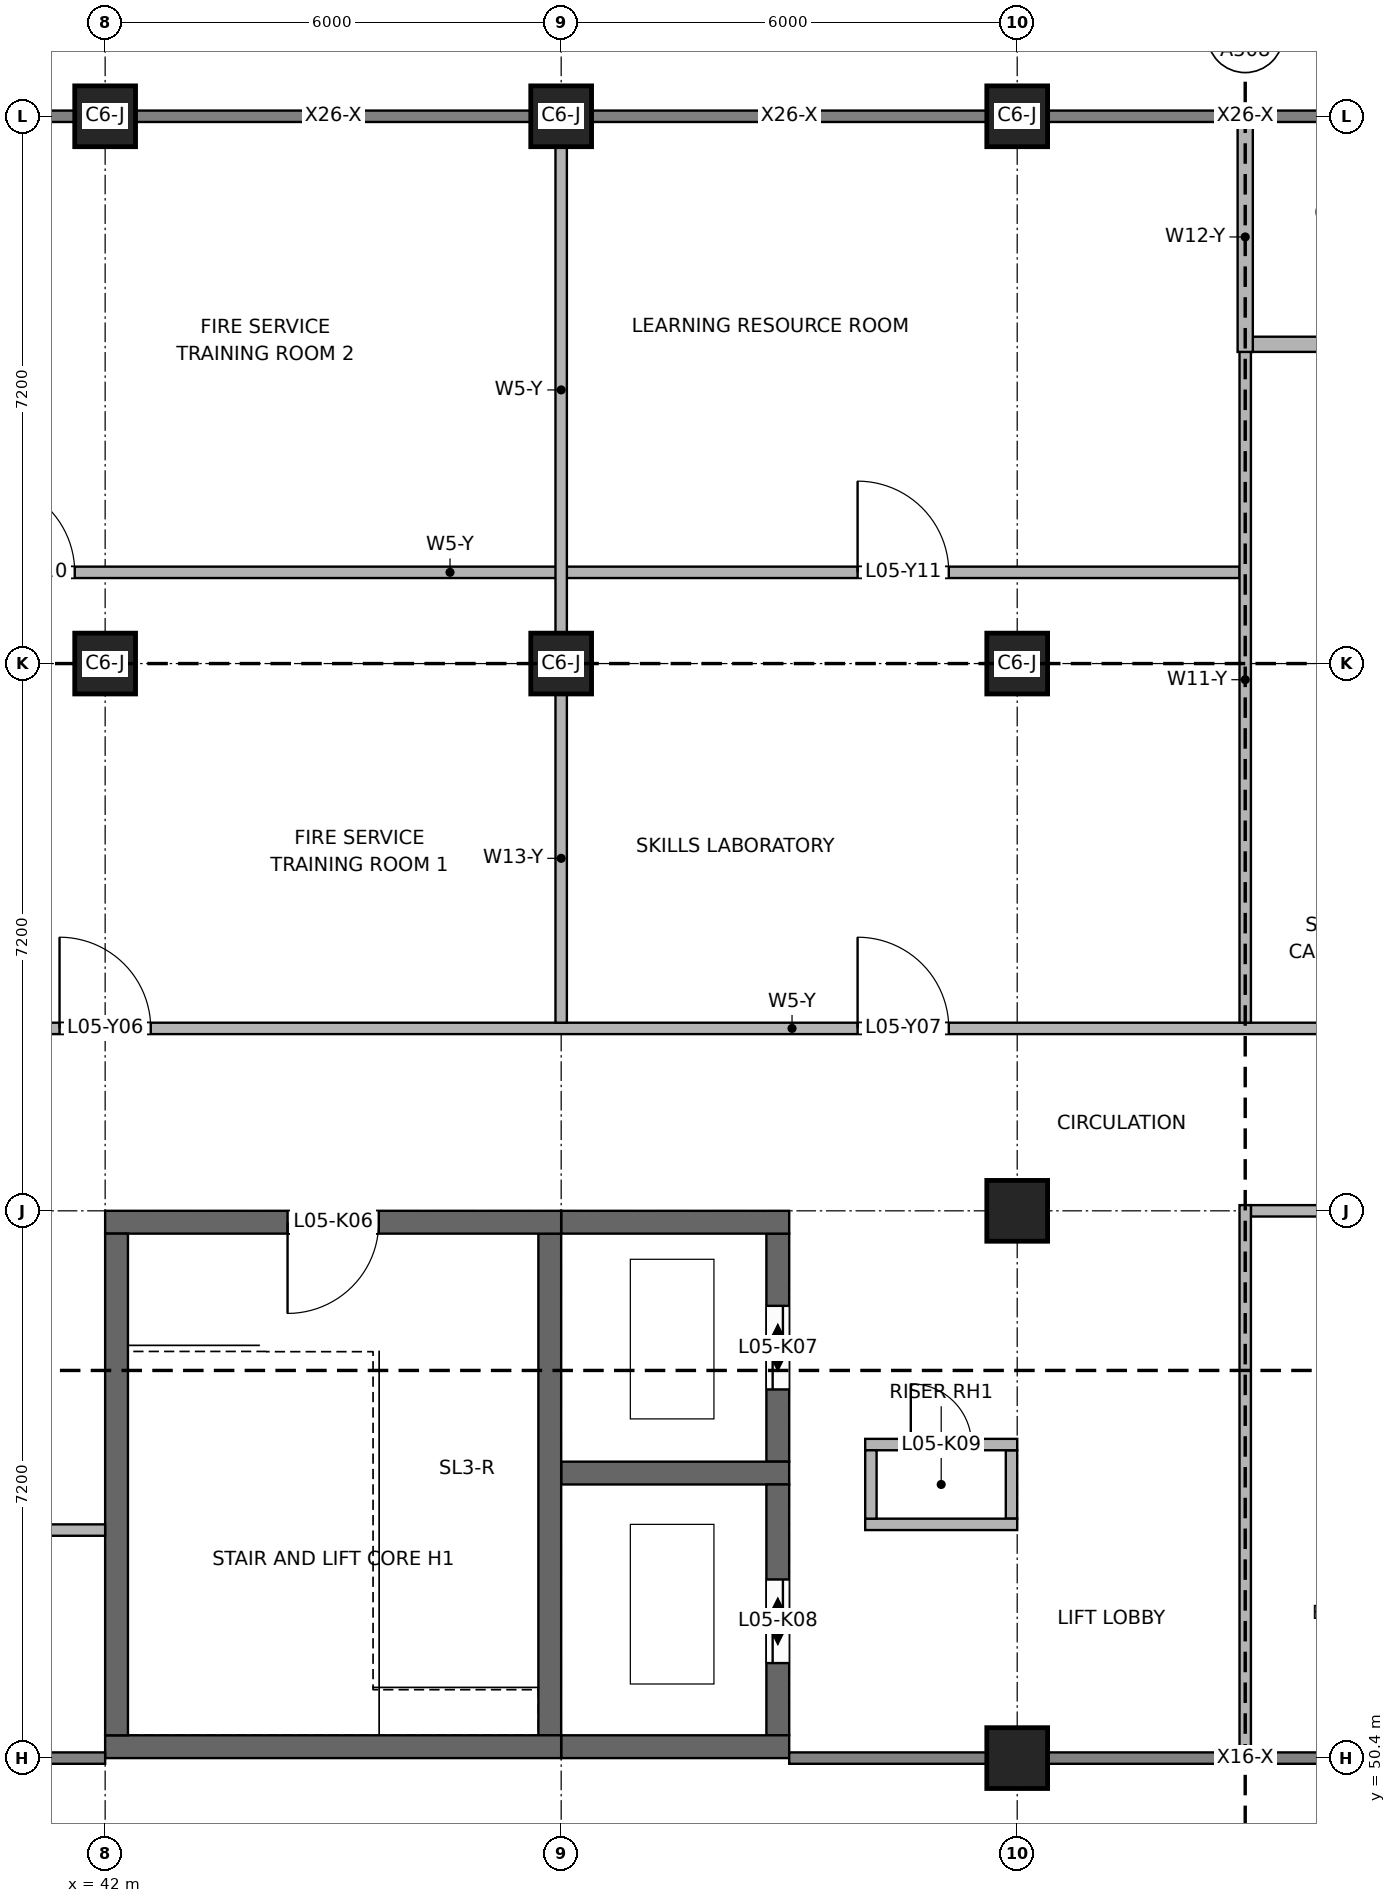
"""IFC4 building model, lengths in metres.
Left out: names, types, materials, properties, quantities, classifications, styles, units other than length and angle.
Written with IfcOpenShell. Run it as: python <this file> out.ifc"""

import sys

from ifc_helpers import new_model, si_unit, direction, frame, frame_2d, origin, origin_2d, place, context, subcontext, project, spatial, rectangle, extrude, element, fill, save


model = new_model("IFC4")
c1 = context("Model", 3, precision=1e-05, world=origin(), true_north=direction((0.0, 1.0)))
c2 = subcontext(c1, "Body", "Model", "MODEL_VIEW")
j1 = project(units=[si_unit("LENGTHUNIT", "METRE"), si_unit("PLANEANGLEUNIT", "RADIAN")], contexts=[c1])
p1 = place(None, origin())
s1 = spatial("IfcSite", under=j1, at=p1, CompositionType="ELEMENT")
p2 = place(p1, origin())
s2 = spatial("IfcBuilding", under=s1, at=p2, CompositionType="ELEMENT")
p3 = place(p2, frame((0.0, 0.0, 21.0)))
s3 = spatial("IfcBuildingStorey", under=s2, at=p3, CompositionType="ELEMENT", Elevation=21.0)
p4 = place(p3, frame((42.0, 50.55, 0.0), z_axis=(0.0, 0.0, 1.0), x_axis=(1.0, 0.0, 0.0)))
e1 = element("IfcWall", 1, at=p4, inside=s3, PredefinedType="SHEAR", context=c2, shape_type="SweptSolid", body=[
    extrude(rectangle(XDim=6.0, YDim=0.3, at=frame_2d((3.0, 0.0))), origin(), (0.0, 0.0, 1.0), 3.95),
])
p5 = place(p3, frame((42.0, 57.45, 0.0), z_axis=(0.0, 0.0, 1.0), x_axis=(1.0, 0.0, 0.0)))
e2 = element("IfcWall", 2, at=p5, inside=s3, PredefinedType="SHEAR", context=c2, shape_type="SweptSolid", body=[
    extrude(rectangle(XDim=6.0, YDim=0.3, at=frame_2d((3.0, 0.0))), origin(), (0.0, 0.0, 1.0), 3.95),
])
p6 = place(p5, frame((2.4, 0.0, 0.0)))
e3 = element("IfcOpeningElement", 3, at=p6, cuts=e2, PredefinedType="OPENING", context=c2, shape_type="SweptSolid", body=[
    extrude(rectangle(XDim=1.2, YDim=2.1, at=frame_2d((0.6, 1.05))), frame((0.0, 0.16, 0.0), z_axis=(0.0, -1.0, 0.0), x_axis=(1.0, 0.0, 0.0)), (0.0, 0.0, 1.0), 0.32),
])
for number, where, z_axis, x_axis in (
    (4, (42.15, 50.7, 0.0), (0.0, 0.0, 1.0), (0.0, 1.0, 0.0)),
    (5, (47.85, 50.7, 0.0), (0.0, 0.0, 1.0), (0.0, 1.0, 0.0)),
):
    element("IfcWall", number, at=place(p3, frame(where, z_axis=z_axis, x_axis=x_axis)), inside=s3, PredefinedType="SHEAR", context=c2, shape_type="SweptSolid", body=[
        extrude(rectangle(XDim=6.6, YDim=0.3, at=frame_2d((3.3, 0.0))), origin(), (0.0, 0.0, 1.0), 3.95),
    ])
for number, where, z_axis, x_axis in (
    (6, (48.0, 54.15, 0.0), (0.0, 0.0, 1.0), (1.0, 0.0, 0.0)),
    (7, (48.0, 57.45, 0.0), (0.0, 0.0, 1.0), (1.0, 0.0, 0.0)),
):
    element("IfcWall", number, at=place(p3, frame(where, z_axis=z_axis, x_axis=x_axis)), inside=s3, PredefinedType="SHEAR", context=c2, shape_type="SweptSolid", body=[
        extrude(rectangle(XDim=3.0, YDim=0.3, at=frame_2d((1.5, 0.0))), origin(), (0.0, 0.0, 1.0), 5.75),
    ])
p7 = place(p3, frame((50.85, 54.3, 0.0), z_axis=(0.0, 0.0, 1.0), x_axis=(0.0, 1.0, 0.0)))
e8 = element("IfcWall", 8, at=p7, inside=s3, PredefinedType="SHEAR", context=c2, shape_type="SweptSolid", body=[
    extrude(rectangle(XDim=3.0, YDim=0.3, at=frame_2d((1.5, 0.0))), origin(), (0.0, 0.0, 1.0), 5.75),
])
p8 = place(p7, frame((0.95, 0.0, 0.0)))
e9 = element("IfcOpeningElement", 9, at=p8, cuts=e8, PredefinedType="OPENING", context=c2, shape_type="SweptSolid", body=[
    extrude(rectangle(XDim=1.1, YDim=2.1, at=frame_2d((0.55, 1.05))), frame((0.0, 0.16, 0.0), z_axis=(0.0, -1.0, 0.0), x_axis=(1.0, 0.0, 0.0)), (0.0, 0.0, 1.0), 0.32),
])
p9 = place(p3, frame((48.0, 50.55, 0.0), z_axis=(0.0, 0.0, 1.0), x_axis=(1.0, 0.0, 0.0)))
e10 = element("IfcWall", 10, at=p9, inside=s3, PredefinedType="SHEAR", context=c2, shape_type="SweptSolid", body=[
    extrude(rectangle(XDim=3.0, YDim=0.3, at=frame_2d((1.5, 0.0))), origin(), (0.0, 0.0, 1.0), 5.75),
])
p10 = place(p3, frame((50.85, 50.7, 0.0), z_axis=(0.0, 0.0, 1.0), x_axis=(0.0, 1.0, 0.0)))
e11 = element("IfcWall", 11, at=p10, inside=s3, PredefinedType="SHEAR", context=c2, shape_type="SweptSolid", body=[
    extrude(rectangle(XDim=3.3, YDim=0.3, at=frame_2d((1.65, 0.0))), origin(), (0.0, 0.0, 1.0), 5.75),
])
p11 = place(p10, frame((0.95, 0.0, 0.0)))
e12 = element("IfcOpeningElement", 12, at=p11, cuts=e11, PredefinedType="OPENING", context=c2, shape_type="SweptSolid", body=[
    extrude(rectangle(XDim=1.1, YDim=2.1, at=frame_2d((0.55, 1.05))), frame((0.0, 0.16, 0.0), z_axis=(0.0, -1.0, 0.0), x_axis=(1.0, 0.0, 0.0)), (0.0, 0.0, 1.0), 0.32),
])
p12 = place(p3, frame((52.0, 53.475, 0.0), z_axis=(0.0, 0.0, 1.0), x_axis=(1.0, 0.0, 0.0)))
e13 = element("IfcWall", 13, at=p12, inside=s3, PredefinedType="SOLIDWALL", context=c2, shape_type="SweptSolid", body=[
    extrude(rectangle(XDim=2.0, YDim=0.15, at=frame_2d((1.0, 0.0))), origin(), (0.0, 0.0, 1.0), 3.95),
])
p13 = place(p3, frame((52.0, 54.525, 0.0), z_axis=(0.0, 0.0, 1.0), x_axis=(1.0, 0.0, 0.0)))
e14 = element("IfcWall", 14, at=p13, inside=s3, PredefinedType="SOLIDWALL", context=c2, shape_type="SweptSolid", body=[
    extrude(rectangle(XDim=2.0, YDim=0.15, at=frame_2d((1.0, 0.0))), origin(), (0.0, 0.0, 1.0), 3.95),
])
p14 = place(p13, frame((0.6, 0.0, 0.0)))
e15 = element("IfcOpeningElement", 15, at=p14, cuts=e14, PredefinedType="OPENING", context=c2, shape_type="SweptSolid", body=[
    extrude(rectangle(XDim=0.8, YDim=2.1, at=frame_2d((0.4, 1.05))), frame((0.0, 0.085, 0.0), z_axis=(0.0, -1.0, 0.0), x_axis=(1.0, 0.0, 0.0)), (0.0, 0.0, 1.0), 0.17),
])
p15 = place(p3, frame((52.075, 53.55, 0.0), z_axis=(0.0, 0.0, 1.0), x_axis=(0.0, 1.0, 0.0)))
e16 = element("IfcWall", 16, at=p15, inside=s3, PredefinedType="SOLIDWALL", context=c2, shape_type="SweptSolid", body=[
    extrude(rectangle(XDim=0.9, YDim=0.15, at=frame_2d((0.45, 0.0))), origin(), (0.0, 0.0, 1.0), 3.95),
])
p16 = place(p3, frame((53.925, 53.55, 0.0), z_axis=(0.0, 0.0, 1.0), x_axis=(0.0, 1.0, 0.0)))
e17 = element("IfcWall", 17, at=p16, inside=s3, PredefinedType="SOLIDWALL", context=c2, shape_type="SweptSolid", body=[
    extrude(rectangle(XDim=0.9, YDim=0.15, at=frame_2d((0.45, 0.0))), origin(), (0.0, 0.0, 1.0), 3.15),
])
for number, where, z_axis, x_axis in (
    (18, (54.0, 50.4, 0.0), (0.0, 0.0, 1.0), (1.0, 0.0, 0.0)),
    (19, (54.0, 57.6, 0.0), (0.0, 0.0, 1.0), (1.0, 0.0, 0.0)),
    (20, (42.0, 64.8, 0.0), (0.0, 0.0, 1.0), (1.0, 0.0, 0.0)),
    (21, (48.0, 64.8, 0.0), (0.0, 0.0, 1.0), (1.0, 0.0, 0.0)),
    (22, (54.0, 64.8, 0.0), (0.0, 0.0, 1.0), (1.0, 0.0, 0.0)),
    (23, (42.0, 72.0, 0.0), (0.0, 0.0, 1.0), (1.0, 0.0, 0.0)),
    (24, (48.0, 72.0, 0.0), (0.0, 0.0, 1.0), (1.0, 0.0, 0.0)),
    (25, (54.0, 72.0, 0.0), (0.0, 0.0, 1.0), (1.0, 0.0, 0.0)),
):
    element("IfcColumn", number, at=place(p3, frame(where, z_axis=z_axis, x_axis=x_axis)), inside=s3, PredefinedType="COLUMN", context=c2, shape_type="SweptSolid", body=[
        extrude(rectangle(XDim=0.8, YDim=0.8, at=origin_2d()), origin(), (0.0, 0.0, 1.0), 3.95),
    ])
p17 = place(p3, frame((48.0, 60.075, 0.0), z_axis=(0.0, 0.0, 1.0), x_axis=(0.0, 1.0, 0.0)))
e26 = element("IfcWall", 26, at=p17, inside=s3, PredefinedType="PARTITIONING", context=c2, shape_type="SweptSolid", body=[
    extrude(rectangle(XDim=4.325, YDim=0.15, at=frame_2d((2.163, 0.0))), origin(), (0.0, 0.0, 1.0), 3.95),
])
p18 = place(p3, frame((48.0, 65.2, 0.0), z_axis=(0.0, 0.0, 1.0), x_axis=(0.0, 1.0, 0.0)))
e27 = element("IfcWall", 27, at=p18, inside=s3, PredefinedType="PARTITIONING", context=c2, shape_type="SweptSolid", body=[
    extrude(rectangle(XDim=6.4, YDim=0.15, at=frame_2d((3.2, 0.0))), origin(), (0.0, 0.0, 1.0), 3.15),
])
p19 = place(p3, frame((57.0, 50.475, 0.0), z_axis=(0.0, 0.0, 1.0), x_axis=(0.0, 1.0, 0.0)))
e28 = element("IfcWall", 28, at=p19, inside=s3, PredefinedType="PARTITIONING", context=c2, shape_type="SweptSolid", body=[
    extrude(rectangle(XDim=7.2, YDim=0.15, at=frame_2d((3.6, 0.0))), origin(), (0.0, 0.0, 1.0), 3.25),
])
p20 = place(p3, frame((57.0, 60.075, 0.0), z_axis=(0.0, 0.0, 1.0), x_axis=(0.0, 1.0, 0.0)))
e29 = element("IfcWall", 29, at=p20, inside=s3, PredefinedType="PARTITIONING", context=c2, shape_type="SweptSolid", body=[
    extrude(rectangle(XDim=9.025, YDim=0.15, at=frame_2d((4.513, 0.0))), origin(), (0.0, 0.0, 1.0), 3.25),
])
p21 = place(p3, frame((57.0, 68.9, 0.0), z_axis=(0.0, 0.0, 1.0), x_axis=(0.0, 1.0, 0.0)))
e30 = element("IfcWall", 30, at=p21, inside=s3, PredefinedType="PARTITIONING", context=c2, shape_type="SweptSolid", body=[
    extrude(rectangle(XDim=3.025, YDim=0.2, at=frame_2d((1.513, 0.0))), origin(), (0.0, 0.0, 1.0), 3.25),
])
p22 = place(p3, frame((39.675, 53.4, 0.0), z_axis=(0.0, 0.0, 1.0), x_axis=(1.0, 0.0, 0.0)))
e31 = element("IfcWall", 31, at=p22, inside=s3, PredefinedType="PARTITIONING", context=c2, shape_type="SweptSolid", body=[
    extrude(rectangle(XDim=2.325, YDim=0.15, at=frame_2d((1.163, 0.0))), origin(), (0.0, 0.0, 1.0), 3.95),
])
p23 = place(p3, frame((57.075, 57.6, 0.0), z_axis=(0.0, 0.0, 1.0), x_axis=(1.0, 0.0, 0.0)))
e32 = element("IfcWall", 32, at=p23, inside=s3, PredefinedType="PARTITIONING", context=c2, shape_type="SweptSolid", body=[
    extrude(rectangle(XDim=26.525, YDim=0.15, at=frame_2d((13.263, 0.0))), origin(), (0.0, 0.0, 1.0), 3.25),
])
p24 = place(p23, frame((3.825, 0.0, 0.0)))
e33 = element("IfcOpeningElement", 33, at=p24, cuts=e32, PredefinedType="OPENING", context=c2, shape_type="SweptSolid", body=[
    extrude(rectangle(XDim=1.2, YDim=2.1, at=frame_2d((0.6, 1.05))), frame((0.0, 0.085, 0.0), z_axis=(0.0, -1.0, 0.0), x_axis=(1.0, 0.0, 0.0)), (0.0, 0.0, 1.0), 0.17),
])
p25 = place(p23, frame((11.175, 0.0, 0.0)))
e34 = element("IfcOpeningElement", 34, at=p25, cuts=e32, PredefinedType="OPENING", context=c2, shape_type="SweptSolid", body=[
    extrude(rectangle(XDim=0.9, YDim=2.1, at=frame_2d((0.45, 1.05))), frame((0.0, 0.085, 0.0), z_axis=(0.0, -1.0, 0.0), x_axis=(1.0, 0.0, 0.0)), (0.0, 0.0, 1.0), 0.17),
])
p26 = place(p23, frame((15.975, 0.0, 0.0)))
e35 = element("IfcOpeningElement", 35, at=p26, cuts=e32, PredefinedType="OPENING", context=c2, shape_type="SweptSolid", body=[
    extrude(rectangle(XDim=0.9, YDim=2.1, at=frame_2d((0.45, 1.05))), frame((0.0, 0.085, 0.0), z_axis=(0.0, -1.0, 0.0), x_axis=(1.0, 0.0, 0.0)), (0.0, 0.0, 1.0), 0.17),
])
p27 = place(p23, frame((21.975, 0.0, 0.0)))
e36 = element("IfcOpeningElement", 36, at=p27, cuts=e32, PredefinedType="OPENING", context=c2, shape_type="SweptSolid", body=[
    extrude(rectangle(XDim=0.9, YDim=2.1, at=frame_2d((0.45, 1.05))), frame((0.0, 0.085, 0.0), z_axis=(0.0, -1.0, 0.0), x_axis=(1.0, 0.0, 0.0)), (0.0, 0.0, 1.0), 0.17),
])
p28 = place(p3, frame((36.15, 60.0, 0.0), z_axis=(0.0, 0.0, 1.0), x_axis=(1.0, 0.0, 0.0)))
e37 = element("IfcWall", 37, at=p28, inside=s3, PredefinedType="PARTITIONING", context=c2, shape_type="SweptSolid", body=[
    extrude(rectangle(XDim=29.775, YDim=0.15, at=frame_2d((14.888, 0.0))), origin(), (0.0, 0.0, 1.0), 3.15),
])
p29 = place(p28, frame((5.25, 0.0, 0.0)))
e38 = element("IfcOpeningElement", 38, at=p29, cuts=e37, PredefinedType="OPENING", context=c2, shape_type="SweptSolid", body=[
    extrude(rectangle(XDim=1.2, YDim=2.1, at=frame_2d((0.6, 1.05))), frame((0.0, 0.085, 0.0), z_axis=(0.0, -1.0, 0.0), x_axis=(1.0, 0.0, 0.0)), (0.0, 0.0, 1.0), 0.17),
])
p30 = place(p28, frame((15.75, 0.0, 0.0)))
e39 = element("IfcOpeningElement", 39, at=p30, cuts=e37, PredefinedType="OPENING", context=c2, shape_type="SweptSolid", body=[
    extrude(rectangle(XDim=1.2, YDim=2.1, at=frame_2d((0.6, 1.05))), frame((0.0, 0.085, 0.0), z_axis=(0.0, -1.0, 0.0), x_axis=(1.0, 0.0, 0.0)), (0.0, 0.0, 1.0), 0.17),
])
p31 = place(p28, frame((24.75, 0.0, 0.0)))
e40 = element("IfcOpeningElement", 40, at=p31, cuts=e37, PredefinedType="OPENING", context=c2, shape_type="SweptSolid", body=[
    extrude(rectangle(XDim=1.2, YDim=2.1, at=frame_2d((0.6, 1.05))), frame((0.0, 0.085, 0.0), z_axis=(0.0, -1.0, 0.0), x_axis=(1.0, 0.0, 0.0)), (0.0, 0.0, 1.0), 0.17),
])
p32 = place(p3, frame((36.15, 66.0, 0.0), z_axis=(0.0, 0.0, 1.0), x_axis=(1.0, 0.0, 0.0)))
e41 = element("IfcWall", 41, at=p32, inside=s3, PredefinedType="PARTITIONING", context=c2, shape_type="SweptSolid", body=[
    extrude(rectangle(XDim=20.775, YDim=0.15, at=frame_2d((10.388, 0.0))), origin(), (0.0, 0.0, 1.0), 3.15),
])
p33 = place(p32, frame((4.25, 0.0, 0.0)))
e42 = element("IfcOpeningElement", 42, at=p33, cuts=e41, PredefinedType="OPENING", context=c2, shape_type="SweptSolid", body=[
    extrude(rectangle(XDim=1.2, YDim=2.1, at=frame_2d((0.6, 1.05))), frame((0.0, 0.085, 0.0), z_axis=(0.0, -1.0, 0.0), x_axis=(1.0, 0.0, 0.0)), (0.0, 0.0, 1.0), 0.17),
])
p34 = place(p32, frame((15.75, 0.0, 0.0)))
e43 = element("IfcOpeningElement", 43, at=p34, cuts=e41, PredefinedType="OPENING", context=c2, shape_type="SweptSolid", body=[
    extrude(rectangle(XDim=1.2, YDim=2.1, at=frame_2d((0.6, 1.05))), frame((0.0, 0.085, 0.0), z_axis=(0.0, -1.0, 0.0), x_axis=(1.0, 0.0, 0.0)), (0.0, 0.0, 1.0), 0.17),
])
p35 = place(p3, frame((57.1, 69.0, 0.0), z_axis=(0.0, 0.0, 1.0), x_axis=(1.0, 0.0, 0.0)))
e44 = element("IfcWall", 44, at=p35, inside=s3, PredefinedType="PARTITIONING", context=c2, shape_type="SweptSolid", body=[
    extrude(rectangle(XDim=8.9, YDim=0.2, at=frame_2d((4.45, 0.0))), origin(), (0.0, 0.0, 1.0), 3.15),
])
p36 = place(p35, frame((3.65, 0.0, 0.0)))
e45 = element("IfcOpeningElement", 45, at=p36, cuts=e44, PredefinedType="OPENING", context=c2, shape_type="SweptSolid", body=[
    extrude(rectangle(XDim=1.5, YDim=2.1, at=frame_2d((0.75, 1.05))), frame((0.0, 0.11, 0.0), z_axis=(0.0, -1.0, 0.0), x_axis=(1.0, 0.0, 0.0)), (0.0, 0.0, 1.0), 0.22),
])
p37 = place(p6, frame((1.2, 0.0, 0.0), z_axis=(0.0, 0.0, 1.0), x_axis=(-1.0, 0.0, 0.0)))
e46 = element("IfcDoor", 46, at=p37, inside=s3, OperationType="SINGLE_SWING_RIGHT", PredefinedType="DOOR", context=c2, shape_type="SweptSolid", body=[
    extrude(rectangle(XDim=1.2, YDim=2.1, at=frame_2d((0.6, 1.05))), frame((0.0, 0.025, 0.0), z_axis=(0.0, -1.0, 0.0), x_axis=(1.0, 0.0, 0.0)), (0.0, 0.0, 1.0), 0.05),
])
fill(e3, e46)
p38 = place(p8, origin())
e47 = element("IfcDoor", 47, at=p38, inside=s3, OperationType="DOUBLE_DOOR_SLIDING", PredefinedType="DOOR", context=c2, shape_type="SweptSolid", body=[
    extrude(rectangle(XDim=1.1, YDim=2.1, at=frame_2d((0.55, 1.05))), frame((0.0, 0.025, 0.0), z_axis=(0.0, -1.0, 0.0), x_axis=(1.0, 0.0, 0.0)), (0.0, 0.0, 1.0), 0.05),
])
fill(e9, e47)
p39 = place(p11, origin())
e48 = element("IfcDoor", 48, at=p39, inside=s3, OperationType="DOUBLE_DOOR_SLIDING", PredefinedType="DOOR", context=c2, shape_type="SweptSolid", body=[
    extrude(rectangle(XDim=1.1, YDim=2.1, at=frame_2d((0.55, 1.05))), frame((0.0, 0.025, 0.0), z_axis=(0.0, -1.0, 0.0), x_axis=(1.0, 0.0, 0.0)), (0.0, 0.0, 1.0), 0.05),
])
fill(e12, e48)
p40 = place(p14, origin())
e49 = element("IfcDoor", 49, at=p40, inside=s3, OperationType="SINGLE_SWING_LEFT", PredefinedType="DOOR", context=c2, shape_type="SweptSolid", body=[
    extrude(rectangle(XDim=0.8, YDim=2.1, at=frame_2d((0.4, 1.05))), frame((0.0, 0.025, 0.0), z_axis=(0.0, -1.0, 0.0), x_axis=(1.0, 0.0, 0.0)), (0.0, 0.0, 1.0), 0.05),
])
fill(e15, e49)
p41 = place(p29, origin())
e50 = element("IfcDoor", 50, at=p41, inside=s3, OperationType="SINGLE_SWING_LEFT", PredefinedType="DOOR", context=c2, shape_type="SweptSolid", body=[
    extrude(rectangle(XDim=1.2, YDim=2.1, at=frame_2d((0.6, 1.05))), frame((0.0, 0.025, 0.0), z_axis=(0.0, -1.0, 0.0), x_axis=(1.0, 0.0, 0.0)), (0.0, 0.0, 1.0), 0.05),
])
fill(e38, e50)
p42 = place(p30, origin())
e51 = element("IfcDoor", 51, at=p42, inside=s3, OperationType="SINGLE_SWING_LEFT", PredefinedType="DOOR", context=c2, shape_type="SweptSolid", body=[
    extrude(rectangle(XDim=1.2, YDim=2.1, at=frame_2d((0.6, 1.05))), frame((0.0, 0.025, 0.0), z_axis=(0.0, -1.0, 0.0), x_axis=(1.0, 0.0, 0.0)), (0.0, 0.0, 1.0), 0.05),
])
fill(e39, e51)
p43 = place(p33, origin())
e52 = element("IfcDoor", 52, at=p43, inside=s3, OperationType="SINGLE_SWING_LEFT", PredefinedType="DOOR", context=c2, shape_type="SweptSolid", body=[
    extrude(rectangle(XDim=1.2, YDim=2.1, at=frame_2d((0.6, 1.05))), frame((0.0, 0.025, 0.0), z_axis=(0.0, -1.0, 0.0), x_axis=(1.0, 0.0, 0.0)), (0.0, 0.0, 1.0), 0.05),
])
fill(e42, e52)
p44 = place(p34, origin())
e53 = element("IfcDoor", 53, at=p44, inside=s3, OperationType="SINGLE_SWING_LEFT", PredefinedType="DOOR", context=c2, shape_type="SweptSolid", body=[
    extrude(rectangle(XDim=1.2, YDim=2.1, at=frame_2d((0.6, 1.05))), frame((0.0, 0.025, 0.0), z_axis=(0.0, -1.0, 0.0), x_axis=(1.0, 0.0, 0.0)), (0.0, 0.0, 1.0), 0.05),
])
fill(e43, e53)
save(model, sys.argv[1])
